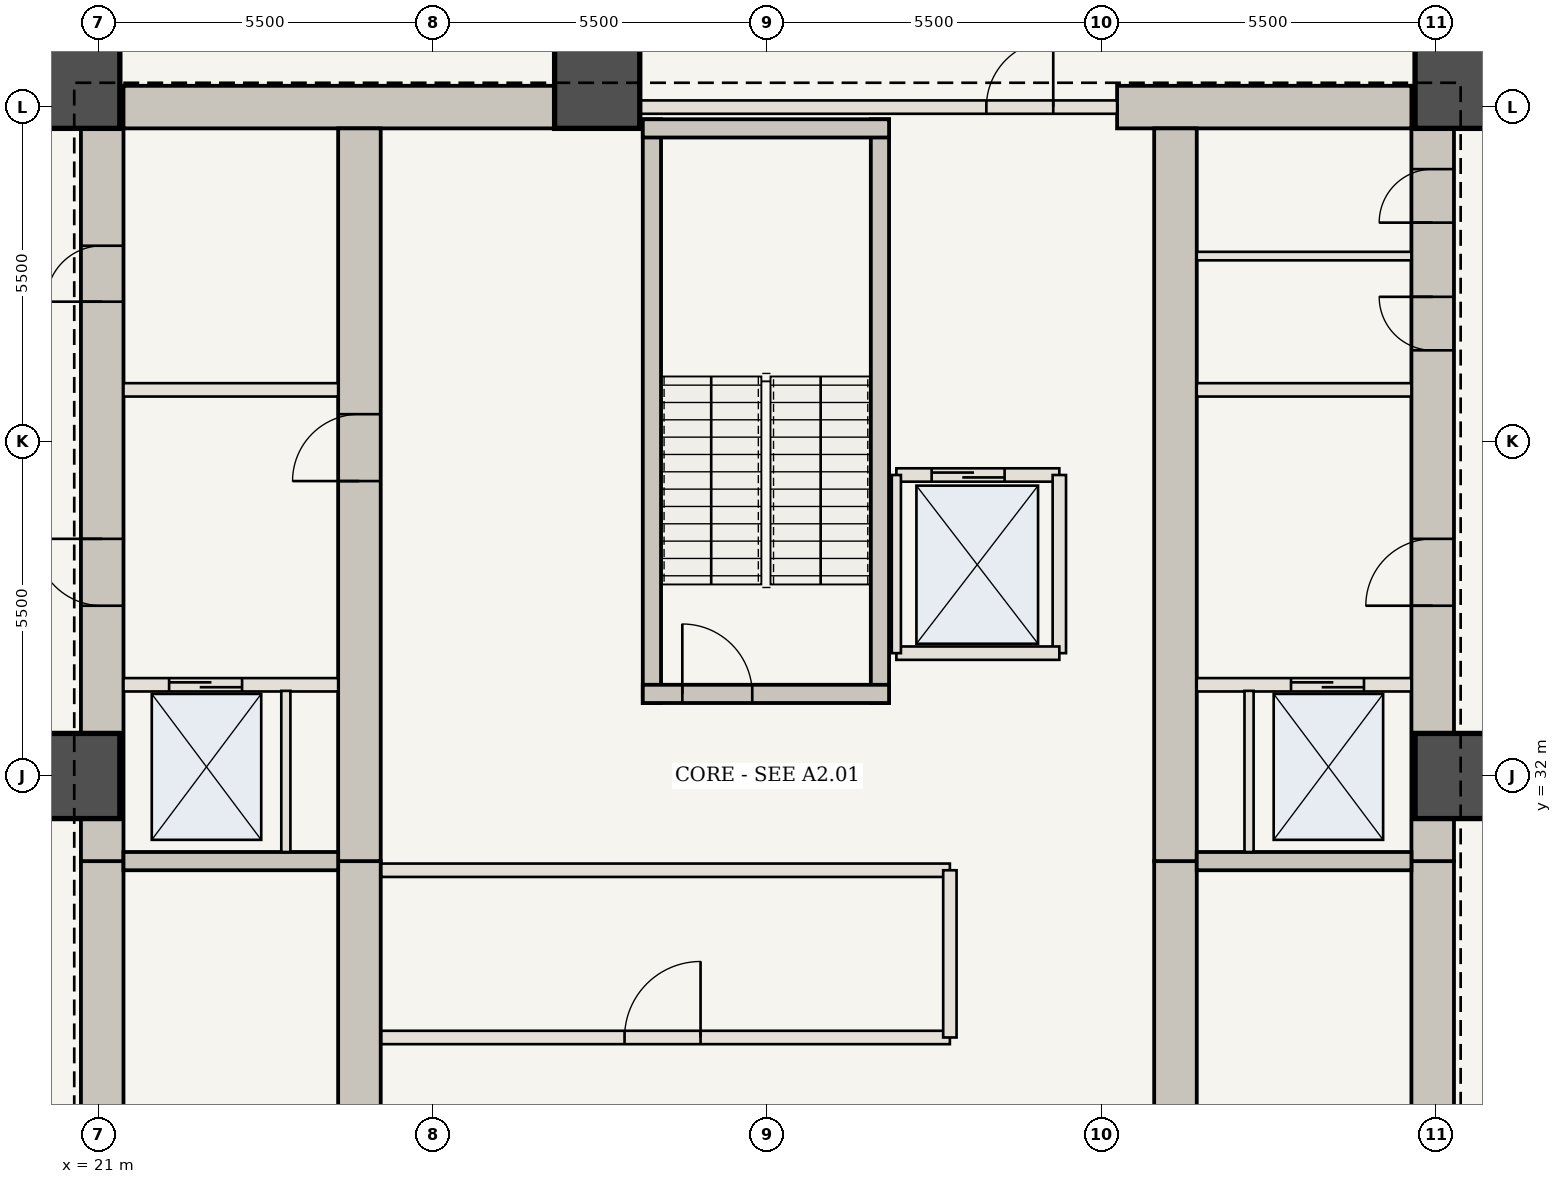
"""IFC4 building model, lengths in metres.
Left out: names, types, materials, properties, quantities, classifications, styles, units other than length and angle.
Written with IfcOpenShell. Run it as: python <this file> out.ifc"""

import sys

from ifc_helpers import new_model, si_unit, direction, frame, frame_2d, origin, origin_2d, place, context, subcontext, project, spatial, rectangle, extrude, element, fill, save


model = new_model("IFC4")
c1 = context("Model", 3, precision=1e-05, world=origin(), true_north=direction((0.0, 1.0)))
c2 = subcontext(c1, "Body", "Model", "MODEL_VIEW")
j1 = project(units=[si_unit("LENGTHUNIT", "METRE"), si_unit("PLANEANGLEUNIT", "RADIAN")], contexts=[c1])
p1 = place(None, origin())
s1 = spatial("IfcSite", under=j1, at=p1, CompositionType="ELEMENT")
p2 = place(p1, origin())
s2 = spatial("IfcBuilding", under=s1, at=p2, CompositionType="ELEMENT")
p3 = place(p2, frame((0.0, 0.0, -9.1)))
s3 = spatial("IfcBuildingStorey", under=s2, at=p3, CompositionType="ELEMENT", Elevation=-9.1)
p4 = place(p3, frame((21.06, 20.6, -0.6), z_axis=(0.0, 0.0, 1.0), x_axis=(0.0, 1.0, 0.0)))
e1 = element("IfcWall", 1, at=p4, inside=s3, PredefinedType="SHEAR", context=c2, shape_type="SweptSolid", body=[
    extrude(rectangle(XDim=10.0, YDim=0.7, at=frame_2d((5.0, 0.0))), origin(), (0.0, 0.0, 1.0), 5.15),
])
p5 = place(p4, frame((1.15, 0.0, 0.6)))
e2 = element("IfcOpeningElement", 2, at=p5, cuts=e1, PredefinedType="OPENING", context=c2, shape_type="SweptSolid", body=[
    extrude(rectangle(XDim=1.15, YDim=2.15, at=frame_2d((0.575, 1.075))), frame((0.0, 0.36, 0.0), z_axis=(0.0, -1.0, 0.0), x_axis=(1.0, 0.0, 0.0)), (0.0, 0.0, 1.0), 0.72),
])
p6 = place(p3, frame((21.06, 30.6, -0.6), z_axis=(0.0, 0.0, 1.0), x_axis=(0.0, 1.0, 0.0)))
e3 = element("IfcWall", 3, at=p6, inside=s3, PredefinedType="SHEAR", context=c2, shape_type="SweptSolid", body=[
    extrude(rectangle(XDim=12.75, YDim=0.7, at=frame_2d((6.375, 0.0))), origin(), (0.0, 0.0, 1.0), 5.15),
])
p7 = place(p6, frame((4.2, 0.0, 0.6)))
e4 = element("IfcOpeningElement", 4, at=p7, cuts=e3, PredefinedType="OPENING", context=c2, shape_type="SweptSolid", body=[
    extrude(rectangle(XDim=1.1, YDim=2.15, at=frame_2d((0.55, 1.075))), frame((0.0, 0.36, 0.0), z_axis=(0.0, -1.0, 0.0), x_axis=(1.0, 0.0, 0.0)), (0.0, 0.0, 1.0), 0.72),
])
p8 = place(p6, frame((9.2, 0.0, 0.6)))
e5 = element("IfcOpeningElement", 5, at=p8, cuts=e3, PredefinedType="OPENING", context=c2, shape_type="SweptSolid", body=[
    extrude(rectangle(XDim=0.92, YDim=2.1, at=frame_2d((0.46, 1.05))), frame((0.0, 0.36, 0.0), z_axis=(0.0, -1.0, 0.0), x_axis=(1.0, 0.0, 0.0)), (0.0, 0.0, 1.0), 0.72),
])
p9 = place(p3, frame((42.94, 20.6, -0.6), z_axis=(0.0, 0.0, 1.0), x_axis=(0.0, 1.0, 0.0)))
e6 = element("IfcWall", 6, at=p9, inside=s3, PredefinedType="SHEAR", context=c2, shape_type="SweptSolid", body=[
    extrude(rectangle(XDim=10.0, YDim=0.7, at=frame_2d((5.0, 0.0))), origin(), (0.0, 0.0, 1.0), 5.15),
])
p10 = place(p9, frame((1.15, 0.0, 0.6)))
e7 = element("IfcOpeningElement", 7, at=p10, cuts=e6, PredefinedType="OPENING", context=c2, shape_type="SweptSolid", body=[
    extrude(rectangle(XDim=1.15, YDim=2.15, at=frame_2d((0.575, 1.075))), frame((0.0, 0.36, 0.0), z_axis=(0.0, -1.0, 0.0), x_axis=(1.0, 0.0, 0.0)), (0.0, 0.0, 1.0), 0.72),
])
p11 = place(p3, frame((42.94, 30.6, -0.6), z_axis=(0.0, 0.0, 1.0), x_axis=(0.0, 1.0, 0.0)))
e8 = element("IfcWall", 8, at=p11, inside=s3, PredefinedType="SHEAR", context=c2, shape_type="SweptSolid", body=[
    extrude(rectangle(XDim=12.75, YDim=0.7, at=frame_2d((6.375, 0.0))), origin(), (0.0, 0.0, 1.0), 5.15),
])
p12 = place(p11, frame((4.2, 0.0, 0.6)))
e9 = element("IfcOpeningElement", 9, at=p12, cuts=e8, PredefinedType="OPENING", context=c2, shape_type="SweptSolid", body=[
    extrude(rectangle(XDim=1.1, YDim=2.15, at=frame_2d((0.55, 1.075))), frame((0.0, 0.36, 0.0), z_axis=(0.0, -1.0, 0.0), x_axis=(1.0, 0.0, 0.0)), (0.0, 0.0, 1.0), 0.72),
])
p13 = place(p11, frame((8.4, 0.0, 0.6)))
e10 = element("IfcOpeningElement", 10, at=p13, cuts=e8, PredefinedType="OPENING", context=c2, shape_type="SweptSolid", body=[
    extrude(rectangle(XDim=0.88, YDim=2.1, at=frame_2d((0.44, 1.05))), frame((0.0, 0.36, 0.0), z_axis=(0.0, -1.0, 0.0), x_axis=(1.0, 0.0, 0.0)), (0.0, 0.0, 1.0), 0.72),
])
p14 = place(p11, frame((10.5, 0.0, 0.6)))
e11 = element("IfcOpeningElement", 11, at=p14, cuts=e8, PredefinedType="OPENING", context=c2, shape_type="SweptSolid", body=[
    extrude(rectangle(XDim=0.88, YDim=2.1, at=frame_2d((0.44, 1.05))), frame((0.0, 0.36, 0.0), z_axis=(0.0, -1.0, 0.0), x_axis=(1.0, 0.0, 0.0)), (0.0, 0.0, 1.0), 0.72),
])
p15 = place(p3, frame((21.41, 43.0, -0.6), z_axis=(0.0, 0.0, 1.0), x_axis=(1.0, 0.0, 0.0)))
e12 = element("IfcWall", 12, at=p15, inside=s3, PredefinedType="SHEAR", context=c2, shape_type="SweptSolid", body=[
    extrude(rectangle(XDim=8.24, YDim=0.7, at=frame_2d((4.12, 0.0))), origin(), (0.0, 0.0, 1.0), 5.15),
])
p16 = place(p3, frame((37.75, 43.0, -0.6), z_axis=(0.0, 0.0, 1.0), x_axis=(1.0, 0.0, 0.0)))
e13 = element("IfcWall", 13, at=p16, inside=s3, PredefinedType="SHEAR", context=c2, shape_type="SweptSolid", body=[
    extrude(rectangle(XDim=4.84, YDim=0.7, at=frame_2d((2.42, 0.0))), origin(), (0.0, 0.0, 1.0), 5.15),
])
p17 = place(p3, frame((25.29, 21.3, -0.6), z_axis=(0.0, 0.0, 1.0), x_axis=(0.0, 1.0, 0.0)))
e14 = element("IfcWall", 14, at=p17, inside=s3, PredefinedType="SHEAR", context=c2, shape_type="SweptSolid", body=[
    extrude(rectangle(XDim=9.3, YDim=0.7, at=frame_2d((4.65, 0.0))), origin(), (0.0, 0.0, 1.0), 5.15),
])
p18 = place(p3, frame((25.29, 30.6, -0.6), z_axis=(0.0, 0.0, 1.0), x_axis=(0.0, 1.0, 0.0)))
e15 = element("IfcWall", 15, at=p18, inside=s3, PredefinedType="SHEAR", context=c2, shape_type="SweptSolid", body=[
    extrude(rectangle(XDim=12.05, YDim=0.7, at=frame_2d((6.025, 0.0))), origin(), (0.0, 0.0, 1.0), 5.15),
])
p19 = place(p18, frame((6.25, 0.0, 0.6)))
e16 = element("IfcOpeningElement", 16, at=p19, cuts=e15, PredefinedType="OPENING", context=c2, shape_type="SweptSolid", body=[
    extrude(rectangle(XDim=1.1, YDim=2.15, at=frame_2d((0.55, 1.075))), frame((0.0, 0.36, 0.0), z_axis=(0.0, -1.0, 0.0), x_axis=(1.0, 0.0, 0.0)), (0.0, 0.0, 1.0), 0.72),
])
p20 = place(p3, frame((38.71, 21.3, -0.6), z_axis=(0.0, 0.0, 1.0), x_axis=(0.0, 1.0, 0.0)))
e17 = element("IfcWall", 17, at=p20, inside=s3, PredefinedType="SHEAR", context=c2, shape_type="SweptSolid", body=[
    extrude(rectangle(XDim=9.3, YDim=0.7, at=frame_2d((4.65, 0.0))), origin(), (0.0, 0.0, 1.0), 5.15),
])
p21 = place(p3, frame((38.71, 30.6, -0.6), z_axis=(0.0, 0.0, 1.0), x_axis=(0.0, 1.0, 0.0)))
e18 = element("IfcWall", 18, at=p21, inside=s3, PredefinedType="SHEAR", context=c2, shape_type="SweptSolid", body=[
    extrude(rectangle(XDim=12.05, YDim=0.7, at=frame_2d((6.025, 0.0))), origin(), (0.0, 0.0, 1.0), 5.15),
])
for number, where, z_axis, x_axis in (
    (19, (43.35, 32.0, -0.6), (0.0, 0.0, 1.0), (1.0, 0.0, 0.0)),
    (20, (43.35, 43.35, -0.6), (0.0, 0.0, 1.0), (1.0, 0.0, 0.0)),
    (21, (29.2, 43.35, -0.6), (0.0, 0.0, 1.0), (1.0, 0.0, 0.0)),
    (22, (20.65, 43.35, -0.6), (0.0, 0.0, 1.0), (1.0, 0.0, 0.0)),
    (23, (20.65, 32.0, -0.6), (0.0, 0.0, 1.0), (1.0, 0.0, 0.0)),
):
    element("IfcColumn", number, at=place(p3, frame(where, z_axis=z_axis, x_axis=x_axis)), inside=s3, PredefinedType="COLUMN", context=c2, shape_type="SweptSolid", body=[
        extrude(rectangle(XDim=1.4, YDim=1.4, at=origin_2d()), origin(), (0.0, 0.0, 1.0), 5.15),
    ])
for number, where, z_axis, x_axis in (
    (24, (21.41, 30.6, 0.0), (0.0, 0.0, 1.0), (1.0, 0.0, 0.0)),
    (25, (39.06, 30.6, 0.0), (0.0, 0.0, 1.0), (1.0, 0.0, 0.0)),
):
    element("IfcWall", number, at=place(p3, frame(where, z_axis=z_axis, x_axis=x_axis)), inside=s3, PredefinedType="SHEAR", context=c2, shape_type="SweptSolid", body=[
        extrude(rectangle(XDim=3.53, YDim=0.3, at=frame_2d((1.765, 0.0))), origin(), (0.0, 0.0, 1.0), 4.25),
    ])
p22 = place(p3, frame((21.41, 33.5, 0.0), z_axis=(0.0, 0.0, 1.0), x_axis=(1.0, 0.0, 0.0)))
e26 = element("IfcWall", 26, at=p22, inside=s3, PredefinedType="STANDARD", context=c2, shape_type="SweptSolid", body=[
    extrude(rectangle(XDim=3.53, YDim=0.22, at=frame_2d((1.765, 0.0))), origin(), (0.0, 0.0, 1.0), 4.25),
])
p23 = place(p22, frame((0.75, 0.0, 0.0)))
e27 = element("IfcOpeningElement", 27, at=p23, cuts=e26, PredefinedType="OPENING", context=c2, shape_type="SweptSolid", body=[
    extrude(rectangle(XDim=1.2, YDim=2.2, at=frame_2d((0.6, 1.1))), frame((0.0, 0.12, 0.0), z_axis=(0.0, -1.0, 0.0), x_axis=(1.0, 0.0, 0.0)), (0.0, 0.0, 1.0), 0.24),
])
p24 = place(p3, frame((24.08, 30.75, 0.0), z_axis=(0.0, 0.0, 1.0), x_axis=(0.0, 1.0, 0.0)))
e28 = element("IfcWall", 28, at=p24, inside=s3, PredefinedType="STANDARD", context=c2, shape_type="SweptSolid", body=[
    extrude(rectangle(XDim=2.65, YDim=0.15, at=frame_2d((1.325, 0.0))), origin(), (0.0, 0.0, 1.0), 4.25),
])
p25 = place(p3, frame((39.06, 33.5, 0.0), z_axis=(0.0, 0.0, 1.0), x_axis=(1.0, 0.0, 0.0)))
e29 = element("IfcWall", 29, at=p25, inside=s3, PredefinedType="STANDARD", context=c2, shape_type="SweptSolid", body=[
    extrude(rectangle(XDim=3.53, YDim=0.22, at=frame_2d((1.765, 0.0))), origin(), (0.0, 0.0, 1.0), 4.25),
])
p26 = place(p25, frame((1.55, 0.0, 0.0)))
e30 = element("IfcOpeningElement", 30, at=p26, cuts=e29, PredefinedType="OPENING", context=c2, shape_type="SweptSolid", body=[
    extrude(rectangle(XDim=1.2, YDim=2.2, at=frame_2d((0.6, 1.1))), frame((0.0, 0.12, 0.0), z_axis=(0.0, -1.0, 0.0), x_axis=(1.0, 0.0, 0.0)), (0.0, 0.0, 1.0), 0.24),
])
p27 = place(p3, frame((39.92, 30.75, 0.0), z_axis=(0.0, 0.0, 1.0), x_axis=(0.0, 1.0, 0.0)))
e31 = element("IfcWall", 31, at=p27, inside=s3, PredefinedType="STANDARD", context=c2, shape_type="SweptSolid", body=[
    extrude(rectangle(XDim=2.65, YDim=0.15, at=frame_2d((1.325, 0.0))), origin(), (0.0, 0.0, 1.0), 4.25),
])
for number, where, z_axis, x_axis in (
    (32, (21.41, 38.35, 0.0), (0.0, 0.0, 1.0), (1.0, 0.0, 0.0)),
    (33, (39.06, 38.35, 0.0), (0.0, 0.0, 1.0), (1.0, 0.0, 0.0)),
):
    element("IfcWall", number, at=place(p3, frame(where, z_axis=z_axis, x_axis=x_axis)), inside=s3, PredefinedType="STANDARD", context=c2, shape_type="SweptSolid", body=[
        extrude(rectangle(XDim=3.53, YDim=0.22, at=frame_2d((1.765, 0.0))), origin(), (0.0, 0.0, 1.0), 4.25),
    ])
p28 = place(p3, frame((39.06, 40.55, 0.0), z_axis=(0.0, 0.0, 1.0), x_axis=(1.0, 0.0, 0.0)))
e34 = element("IfcWall", 34, at=p28, inside=s3, PredefinedType="STANDARD", context=c2, shape_type="SweptSolid", body=[
    extrude(rectangle(XDim=3.53, YDim=0.14, at=frame_2d((1.765, 0.0))), origin(), (0.0, 0.0, 1.0), 4.25),
])
p29 = place(p3, frame((25.65, 27.7, 0.0), z_axis=(0.0, 0.0, 1.0), x_axis=(1.0, 0.0, 0.0)))
e35 = element("IfcWall", 35, at=p29, inside=s3, PredefinedType="STANDARD", context=c2, shape_type="SweptSolid", body=[
    extrude(rectangle(XDim=9.35, YDim=0.22, at=frame_2d((4.675, 0.0))), origin(), (0.0, 0.0, 1.0), 4.25),
])
p30 = place(p29, frame((4.0, 0.0, 0.0)))
e36 = element("IfcOpeningElement", 36, at=p30, cuts=e35, PredefinedType="OPENING", context=c2, shape_type="SweptSolid", body=[
    extrude(rectangle(XDim=1.25, YDim=2.2, at=frame_2d((0.625, 1.1))), frame((0.0, 0.12, 0.0), z_axis=(0.0, -1.0, 0.0), x_axis=(1.0, 0.0, 0.0)), (0.0, 0.0, 1.0), 0.24),
])
p31 = place(p3, frame((25.65, 30.45, 0.0), z_axis=(0.0, 0.0, 1.0), x_axis=(1.0, 0.0, 0.0)))
e37 = element("IfcWall", 37, at=p31, inside=s3, PredefinedType="STANDARD", context=c2, shape_type="SweptSolid", body=[
    extrude(rectangle(XDim=9.35, YDim=0.22, at=frame_2d((4.675, 0.0))), origin(), (0.0, 0.0, 1.0), 4.25),
])
p32 = place(p3, frame((35.0, 27.7, 0.0), z_axis=(0.0, 0.0, 1.0), x_axis=(0.0, 1.0, 0.0)))
e38 = element("IfcWall", 38, at=p32, inside=s3, PredefinedType="STANDARD", context=c2, shape_type="SweptSolid", body=[
    extrude(rectangle(XDim=2.75, YDim=0.22, at=frame_2d((1.375, 0.0))), origin(), (0.0, 0.0, 1.0), 4.25),
])
for number, where, z_axis, x_axis in (
    (39, (30.1, 33.2, 0.0), (0.0, 0.0, 1.0), (0.0, 1.0, 0.0)),
    (40, (33.85, 33.2, 0.0), (0.0, 0.0, 1.0), (0.0, 1.0, 0.0)),
):
    element("IfcWall", number, at=place(p3, frame(where, z_axis=z_axis, x_axis=x_axis)), inside=s3, PredefinedType="SHEAR", context=c2, shape_type="SweptSolid", body=[
        extrude(rectangle(XDim=9.6, YDim=0.3, at=frame_2d((4.8, 0.0))), origin(), (0.0, 0.0, 1.0), 4.25),
    ])
p33 = place(p3, frame((29.95, 33.35, 0.0), z_axis=(0.0, 0.0, 1.0), x_axis=(1.0, 0.0, 0.0)))
e41 = element("IfcWall", 41, at=p33, inside=s3, PredefinedType="SHEAR", context=c2, shape_type="SweptSolid", body=[
    extrude(rectangle(XDim=4.05, YDim=0.3, at=frame_2d((2.025, 0.0))), origin(), (0.0, 0.0, 1.0), 4.25),
])
p34 = place(p33, frame((0.65, 0.0, 0.0)))
e42 = element("IfcOpeningElement", 42, at=p34, cuts=e41, PredefinedType="OPENING", context=c2, shape_type="SweptSolid", body=[
    extrude(rectangle(XDim=1.15, YDim=2.15, at=frame_2d((0.575, 1.075))), frame((0.0, 0.16, 0.0), z_axis=(0.0, -1.0, 0.0), x_axis=(1.0, 0.0, 0.0)), (0.0, 0.0, 1.0), 0.32),
])
p35 = place(p3, frame((29.95, 42.65, 0.0), z_axis=(0.0, 0.0, 1.0), x_axis=(1.0, 0.0, 0.0)))
e43 = element("IfcWall", 43, at=p35, inside=s3, PredefinedType="SHEAR", context=c2, shape_type="SweptSolid", body=[
    extrude(rectangle(XDim=4.05, YDim=0.3, at=frame_2d((2.025, 0.0))), origin(), (0.0, 0.0, 1.0), 4.25),
])
p36 = place(p3, frame((29.65, 43.0, 0.0), z_axis=(0.0, 0.0, 1.0), x_axis=(1.0, 0.0, 0.0)))
e44 = element("IfcWall", 44, at=p36, inside=s3, PredefinedType="STANDARD", context=c2, shape_type="SweptSolid", body=[
    extrude(rectangle(XDim=8.1, YDim=0.22, at=frame_2d((4.05, 0.0))), origin(), (0.0, 0.0, 1.0), 4.25),
])
p37 = place(p36, frame((5.95, 0.0, 0.0)))
e45 = element("IfcOpeningElement", 45, at=p37, cuts=e44, PredefinedType="OPENING", context=c2, shape_type="SweptSolid", body=[
    extrude(rectangle(XDim=1.1, YDim=2.15, at=frame_2d((0.55, 1.075))), frame((0.0, 0.12, 0.0), z_axis=(0.0, -1.0, 0.0), x_axis=(1.0, 0.0, 0.0)), (0.0, 0.0, 1.0), 0.24),
])
p38 = place(p3, frame((34.12, 36.95, 0.0), z_axis=(0.0, 0.0, 1.0), x_axis=(1.0, 0.0, 0.0)))
e46 = element("IfcWall", 46, at=p38, inside=s3, PredefinedType="STANDARD", context=c2, shape_type="SweptSolid", body=[
    extrude(rectangle(XDim=2.68, YDim=0.22, at=frame_2d((1.34, 0.0))), origin(), (0.0, 0.0, 1.0), 4.25),
])
p39 = place(p38, frame((0.58, 0.0, 0.0)))
e47 = element("IfcOpeningElement", 47, at=p39, cuts=e46, PredefinedType="OPENING", context=c2, shape_type="SweptSolid", body=[
    extrude(rectangle(XDim=1.2, YDim=2.2, at=frame_2d((0.6, 1.1))), frame((0.0, 0.12, 0.0), z_axis=(0.0, -1.0, 0.0), x_axis=(1.0, 0.0, 0.0)), (0.0, 0.0, 1.0), 0.24),
])
p40 = place(p3, frame((36.8, 34.02, 0.0), z_axis=(0.0, 0.0, 1.0), x_axis=(0.0, 1.0, 0.0)))
e48 = element("IfcWall", 48, at=p40, inside=s3, PredefinedType="STANDARD", context=c2, shape_type="SweptSolid", body=[
    extrude(rectangle(XDim=2.93, YDim=0.22, at=frame_2d((1.465, 0.0))), origin(), (0.0, 0.0, 1.0), 4.25),
])
p41 = place(p3, frame((34.12, 34.02, 0.0), z_axis=(0.0, 0.0, 1.0), x_axis=(1.0, 0.0, 0.0)))
e49 = element("IfcWall", 49, at=p41, inside=s3, PredefinedType="STANDARD", context=c2, shape_type="SweptSolid", body=[
    extrude(rectangle(XDim=2.68, YDim=0.22, at=frame_2d((1.34, 0.0))), origin(), (0.0, 0.0, 1.0), 4.25),
])
p42 = place(p3, frame((34.12, 34.02, 0.0), z_axis=(0.0, 0.0, 1.0), x_axis=(0.0, 1.0, 0.0)))
e50 = element("IfcWall", 50, at=p42, inside=s3, PredefinedType="STANDARD", context=c2, shape_type="SweptSolid", body=[
    extrude(rectangle(XDim=2.93, YDim=0.15, at=frame_2d((1.465, 0.0))), origin(), (0.0, 0.0, 1.0), 4.25),
])
p43 = place(p7, origin())
e51 = element("IfcDoor", 51, at=p43, inside=s3, OperationType="SINGLE_SWING_RIGHT", PredefinedType="DOOR", context=c2, shape_type="SweptSolid", body=[
    extrude(rectangle(XDim=1.1, YDim=2.15, at=frame_2d((0.55, 1.075))), frame((0.0, 0.025, 0.0), z_axis=(0.0, -1.0, 0.0), x_axis=(1.0, 0.0, 0.0)), (0.0, 0.0, 1.0), 0.05),
])
fill(e4, e51)
p44 = place(p12, origin())
e52 = element("IfcDoor", 52, at=p44, inside=s3, OperationType="SINGLE_SWING_LEFT", PredefinedType="DOOR", context=c2, shape_type="SweptSolid", body=[
    extrude(rectangle(XDim=1.1, YDim=2.15, at=frame_2d((0.55, 1.075))), frame((0.0, 0.025, 0.0), z_axis=(0.0, -1.0, 0.0), x_axis=(1.0, 0.0, 0.0)), (0.0, 0.0, 1.0), 0.05),
])
fill(e9, e52)
p45 = place(p19, origin())
e53 = element("IfcDoor", 53, at=p45, inside=s3, OperationType="SINGLE_SWING_LEFT", PredefinedType="DOOR", context=c2, shape_type="SweptSolid", body=[
    extrude(rectangle(XDim=1.1, YDim=2.15, at=frame_2d((0.55, 1.075))), frame((0.0, 0.025, 0.0), z_axis=(0.0, -1.0, 0.0), x_axis=(1.0, 0.0, 0.0)), (0.0, 0.0, 1.0), 0.05),
])
fill(e16, e53)
p46 = place(p8, origin())
e54 = element("IfcDoor", 54, at=p46, inside=s3, OperationType="SINGLE_SWING_LEFT", PredefinedType="DOOR", context=c2, shape_type="SweptSolid", body=[
    extrude(rectangle(XDim=0.92, YDim=2.1, at=frame_2d((0.46, 1.05))), frame((0.0, 0.025, 0.0), z_axis=(0.0, -1.0, 0.0), x_axis=(1.0, 0.0, 0.0)), (0.0, 0.0, 1.0), 0.05),
])
fill(e5, e54)
p47 = place(p13, origin())
e55 = element("IfcDoor", 55, at=p47, inside=s3, OperationType="SINGLE_SWING_RIGHT", PredefinedType="DOOR", context=c2, shape_type="SweptSolid", body=[
    extrude(rectangle(XDim=0.88, YDim=2.1, at=frame_2d((0.44, 1.05))), frame((0.0, 0.025, 0.0), z_axis=(0.0, -1.0, 0.0), x_axis=(1.0, 0.0, 0.0)), (0.0, 0.0, 1.0), 0.05),
])
fill(e10, e55)
p48 = place(p14, origin())
e56 = element("IfcDoor", 56, at=p48, inside=s3, OperationType="SINGLE_SWING_LEFT", PredefinedType="DOOR", context=c2, shape_type="SweptSolid", body=[
    extrude(rectangle(XDim=0.88, YDim=2.1, at=frame_2d((0.44, 1.05))), frame((0.0, 0.025, 0.0), z_axis=(0.0, -1.0, 0.0), x_axis=(1.0, 0.0, 0.0)), (0.0, 0.0, 1.0), 0.05),
])
fill(e11, e56)
p49 = place(p23, origin())
e57 = element("IfcDoor", 57, at=p49, inside=s3, OperationType="DOUBLE_DOOR_SLIDING", PredefinedType="DOOR", context=c2, shape_type="SweptSolid", body=[
    extrude(rectangle(XDim=1.2, YDim=2.2, at=frame_2d((0.6, 1.1))), frame((0.0, 0.025, 0.0), z_axis=(0.0, -1.0, 0.0), x_axis=(1.0, 0.0, 0.0)), (0.0, 0.0, 1.0), 0.05),
])
fill(e27, e57)
p50 = place(p26, origin())
e58 = element("IfcDoor", 58, at=p50, inside=s3, OperationType="DOUBLE_DOOR_SLIDING", PredefinedType="DOOR", context=c2, shape_type="SweptSolid", body=[
    extrude(rectangle(XDim=1.2, YDim=2.2, at=frame_2d((0.6, 1.1))), frame((0.0, 0.025, 0.0), z_axis=(0.0, -1.0, 0.0), x_axis=(1.0, 0.0, 0.0)), (0.0, 0.0, 1.0), 0.05),
])
fill(e30, e58)
p51 = place(p30, origin())
e59 = element("IfcDoor", 59, at=p51, inside=s3, OperationType="SINGLE_SWING_RIGHT", PredefinedType="DOOR", context=c2, shape_type="SweptSolid", body=[
    extrude(rectangle(XDim=1.25, YDim=2.2, at=frame_2d((0.625, 1.1))), frame((0.0, 0.025, 0.0), z_axis=(0.0, -1.0, 0.0), x_axis=(1.0, 0.0, 0.0)), (0.0, 0.0, 1.0), 0.05),
])
fill(e36, e59)
p52 = place(p34, origin())
e60 = element("IfcDoor", 60, at=p52, inside=s3, OperationType="SINGLE_SWING_LEFT", PredefinedType="DOOR", context=c2, shape_type="SweptSolid", body=[
    extrude(rectangle(XDim=1.15, YDim=2.15, at=frame_2d((0.575, 1.075))), frame((0.0, 0.025, 0.0), z_axis=(0.0, -1.0, 0.0), x_axis=(1.0, 0.0, 0.0)), (0.0, 0.0, 1.0), 0.05),
])
fill(e42, e60)
p53 = place(p37, origin())
e61 = element("IfcDoor", 61, at=p53, inside=s3, OperationType="SINGLE_SWING_RIGHT", PredefinedType="DOOR", context=c2, shape_type="SweptSolid", body=[
    extrude(rectangle(XDim=1.1, YDim=2.15, at=frame_2d((0.55, 1.075))), frame((0.0, 0.025, 0.0), z_axis=(0.0, -1.0, 0.0), x_axis=(1.0, 0.0, 0.0)), (0.0, 0.0, 1.0), 0.05),
])
fill(e45, e61)
p54 = place(p39, origin())
e62 = element("IfcDoor", 62, at=p54, inside=s3, OperationType="DOUBLE_DOOR_SLIDING", PredefinedType="DOOR", context=c2, shape_type="SweptSolid", body=[
    extrude(rectangle(XDim=1.2, YDim=2.2, at=frame_2d((0.6, 1.1))), frame((0.0, 0.025, 0.0), z_axis=(0.0, -1.0, 0.0), x_axis=(1.0, 0.0, 0.0)), (0.0, 0.0, 1.0), 0.05),
])
fill(e47, e62)
save(model, sys.argv[1])
